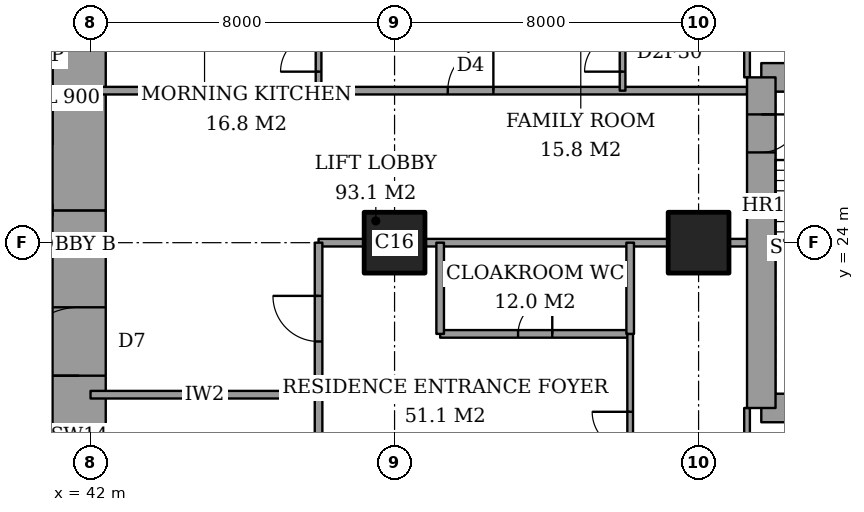
"""IFC4 building model, lengths in metres.
Left out: names, types, materials, properties, quantities, classifications, styles, units other than length and angle.
Written with IfcOpenShell. Run it as: python <this file> out.ifc"""

import sys

from ifc_helpers import new_model, si_unit, direction, frame, frame_2d, origin, origin_2d, place, context, subcontext, project, spatial, rectangle, extrude, element, fill, save


model = new_model("IFC4")
c1 = context("Model", 3, precision=1e-05, world=origin(), true_north=direction((0.0, 1.0)))
c2 = subcontext(c1, "Body", "Model", "MODEL_VIEW")
j1 = project(units=[si_unit("LENGTHUNIT", "METRE"), si_unit("PLANEANGLEUNIT", "RADIAN")], contexts=[c1])
p1 = place(None, origin())
s1 = spatial("IfcSite", under=j1, at=p1, CompositionType="ELEMENT")
p2 = place(p1, origin())
s2 = spatial("IfcBuilding", under=s1, at=p2, CompositionType="ELEMENT")
p3 = place(p2, frame((0.0, 0.0, 266.4)))
s3 = spatial("IfcBuildingStorey", under=s2, at=p3, CompositionType="ELEMENT", Elevation=266.4)
for number, where, z_axis, x_axis in (
    (1, (50.0, 24.0, 0.0), (0.0, 0.0, 1.0), (1.0, 0.0, 0.0)),
    (2, (58.0, 24.0, 0.0), (0.0, 0.0, 1.0), (1.0, 0.0, 0.0)),
):
    element("IfcColumn", number, at=place(p3, frame(where, z_axis=z_axis, x_axis=x_axis)), inside=s3, PredefinedType="COLUMN", context=c2, shape_type="SweptSolid", body=[
        extrude(rectangle(XDim=1.6, YDim=1.6, at=origin_2d()), origin(), (0.0, 0.0, 1.0), 3.6),
    ])
p4 = place(p3, frame((41.7, 13.0, 0.0), z_axis=(0.0, 0.0, 1.0), x_axis=(0.0, 1.0, 0.0)))
e3 = element("IfcWall", 3, at=p4, inside=s3, PredefinedType="SHEAR", context=c2, shape_type="SweptSolid", body=[
    extrude(rectangle(XDim=11.85, YDim=1.4, at=frame_2d((5.925, 0.0))), origin(), (0.0, 0.0, 1.0), 3.6),
])
p5 = place(p4, frame((7.5, 0.0, 0.0)))
e4 = element("IfcOpeningElement", 4, at=p5, cuts=e3, PredefinedType="OPENING", context=c2, shape_type="SweptSolid", body=[
    extrude(rectangle(XDim=1.8, YDim=2.4, at=frame_2d((0.9, 1.2))), frame((0.0, 0.71, 0.0), z_axis=(0.0, -1.0, 0.0), x_axis=(1.0, 0.0, 0.0)), (0.0, 0.0, 1.0), 1.42),
])
p6 = place(p3, frame((41.7, 24.85, 0.0), z_axis=(0.0, 0.0, 1.0), x_axis=(0.0, 1.0, 0.0)))
e5 = element("IfcWall", 5, at=p6, inside=s3, PredefinedType="SHEAR", context=c2, shape_type="SweptSolid", body=[
    extrude(rectangle(XDim=10.15, YDim=1.4, at=frame_2d((5.075, 0.0))), origin(), (0.0, 0.0, 1.0), 3.6),
])
for number, where, z_axis, x_axis in (
    (6, (59.65, 19.65, 0.0), (0.0, 0.0, 1.0), (1.0, 0.0, 0.0)),
    (7, (64.1, 28.35, 0.0), (0.0, 0.0, 1.0), (-1.0, 0.0, 0.0)),
):
    element("IfcWall", number, at=place(p3, frame(where, z_axis=z_axis, x_axis=x_axis)), inside=s3, PredefinedType="SHEAR", context=c2, shape_type="SweptSolid", body=[
        extrude(rectangle(XDim=4.45, YDim=0.75, at=frame_2d((2.225, 0.0))), origin(), (0.0, 0.0, 1.0), 3.6),
    ])
p7 = place(p3, frame((59.65, 28.35, 0.0), z_axis=(0.0, 0.0, 1.0), x_axis=(0.0, -1.0, 0.0)))
e8 = element("IfcWall", 8, at=p7, inside=s3, PredefinedType="SHEAR", context=c2, shape_type="SweptSolid", body=[
    extrude(rectangle(XDim=8.7, YDim=0.75, at=frame_2d((4.35, 0.0))), origin(), (0.0, 0.0, 1.0), 3.6),
])
p8 = place(p7, frame((0.975, 0.0, 0.0)))
e9 = element("IfcOpeningElement", 9, at=p8, cuts=e8, PredefinedType="OPENING", context=c2, shape_type="SweptSolid", body=[
    extrude(rectangle(XDim=1.0, YDim=2.1, at=frame_2d((0.5, 1.05))), frame((0.0, 0.385, 0.0), z_axis=(0.0, -1.0, 0.0), x_axis=(1.0, 0.0, 0.0)), (0.0, 0.0, 1.0), 0.77),
])
p9 = place(p3, frame((42.0, 20.0, 0.0), z_axis=(0.0, 0.0, 1.0), x_axis=(1.0, 0.0, 0.0)))
e10 = element("IfcWall", 10, at=p9, inside=s3, PredefinedType="PARTITIONING", context=c2, shape_type="SweptSolid", body=[
    extrude(rectangle(XDim=6.0, YDim=0.2, at=frame_2d((3.0, 0.0))), origin(), (0.0, 0.0, 1.0), 3.35),
])
p10 = place(p3, frame((51.2, 21.6, 0.0), z_axis=(0.0, 0.0, 1.0), x_axis=(1.0, 0.0, 0.0)))
e11 = element("IfcWall", 11, at=p10, inside=s3, PredefinedType="PARTITIONING", context=c2, shape_type="SweptSolid", body=[
    extrude(rectangle(XDim=5.0, YDim=0.2, at=frame_2d((2.5, 0.0))), origin(), (0.0, 0.0, 1.0), 3.35),
])
p11 = place(p10, frame((2.05, 0.0, 0.0)))
e12 = element("IfcOpeningElement", 12, at=p11, cuts=e11, PredefinedType="OPENING", context=c2, shape_type="SweptSolid", body=[
    extrude(rectangle(XDim=0.9, YDim=2.1, at=frame_2d((0.45, 1.05))), frame((0.0, 0.11, 0.0), z_axis=(0.0, -1.0, 0.0), x_axis=(1.0, 0.0, 0.0)), (0.0, 0.0, 1.0), 0.22),
])
p12 = place(p3, frame((48.0, 24.0, 0.0), z_axis=(0.0, 0.0, 1.0), x_axis=(1.0, 0.0, 0.0)))
e13 = element("IfcWall", 13, at=p12, inside=s3, PredefinedType="PARTITIONING", context=c2, shape_type="SweptSolid", body=[
    extrude(rectangle(XDim=1.2, YDim=0.2, at=frame_2d((0.6, 0.0))), origin(), (0.0, 0.0, 1.0), 3.35),
])
p13 = place(p3, frame((50.8, 24.0, 0.0), z_axis=(0.0, 0.0, 1.0), x_axis=(1.0, 0.0, 0.0)))
e14 = element("IfcWall", 14, at=p13, inside=s3, PredefinedType="PARTITIONING", context=c2, shape_type="SweptSolid", body=[
    extrude(rectangle(XDim=6.4, YDim=0.2, at=frame_2d((3.2, 0.0))), origin(), (0.0, 0.0, 1.0), 3.35),
])
p14 = place(p3, frame((58.8, 24.0, 0.0), z_axis=(0.0, 0.0, 1.0), x_axis=(1.0, 0.0, 0.0)))
e15 = element("IfcWall", 15, at=p14, inside=s3, PredefinedType="PARTITIONING", context=c2, shape_type="SweptSolid", body=[
    extrude(rectangle(XDim=0.475, YDim=0.2, at=frame_2d((0.237, 0.0))), origin(), (0.0, 0.0, 1.0), 3.35),
])
p15 = place(p3, frame((42.0, 28.0, 0.0), z_axis=(0.0, 0.0, 1.0), x_axis=(1.0, 0.0, 0.0)))
e16 = element("IfcWall", 16, at=p15, inside=s3, PredefinedType="PARTITIONING", context=c2, shape_type="SweptSolid", body=[
    extrude(rectangle(XDim=17.275, YDim=0.2, at=frame_2d((8.637, 0.0))), origin(), (0.0, 0.0, 1.0), 3.35),
])
p16 = place(p15, frame((9.4, 0.0, 0.0)))
e17 = element("IfcOpeningElement", 17, at=p16, cuts=e16, PredefinedType="OPENING", context=c2, shape_type="SweptSolid", body=[
    extrude(rectangle(XDim=1.2, YDim=2.4, at=frame_2d((0.6, 1.2))), frame((0.0, 0.11, 0.0), z_axis=(0.0, -1.0, 0.0), x_axis=(1.0, 0.0, 0.0)), (0.0, 0.0, 1.0), 0.22),
])
p17 = place(p3, frame((48.0, 16.5, 0.0), z_axis=(0.0, 0.0, 1.0), x_axis=(0.0, 1.0, 0.0)))
e18 = element("IfcWall", 18, at=p17, inside=s3, PredefinedType="PARTITIONING", context=c2, shape_type="SweptSolid", body=[
    extrude(rectangle(XDim=7.5, YDim=0.2, at=frame_2d((3.75, 0.0))), origin(), (0.0, 0.0, 1.0), 3.35),
])
p18 = place(p17, frame((4.9, 0.0, 0.0)))
e19 = element("IfcOpeningElement", 19, at=p18, cuts=e18, PredefinedType="OPENING", context=c2, shape_type="SweptSolid", body=[
    extrude(rectangle(XDim=1.2, YDim=2.4, at=frame_2d((0.6, 1.2))), frame((0.0, 0.11, 0.0), z_axis=(0.0, -1.0, 0.0), x_axis=(1.0, 0.0, 0.0)), (0.0, 0.0, 1.0), 0.22),
])
p19 = place(p17, frame((1.3, 0.0, 0.0)))
e20 = element("IfcOpeningElement", 20, at=p19, cuts=e18, PredefinedType="OPENING", context=c2, shape_type="SweptSolid", body=[
    extrude(rectangle(XDim=0.9, YDim=2.1, at=frame_2d((0.45, 1.05))), frame((0.0, 0.11, 0.0), z_axis=(0.0, -1.0, 0.0), x_axis=(1.0, 0.0, 0.0)), (0.0, 0.0, 1.0), 0.22),
])
p20 = place(p3, frame((48.0, 28.0, 0.0), z_axis=(0.0, 0.0, 1.0), x_axis=(0.0, 1.0, 0.0)))
e21 = element("IfcWall", 21, at=p20, inside=s3, PredefinedType="PARTITIONING", context=c2, shape_type="SweptSolid", body=[
    extrude(rectangle(XDim=9.2, YDim=0.15, at=frame_2d((4.6, 0.0))), origin(), (0.0, 0.0, 1.0), 3.35),
])
p21 = place(p20, frame((0.5, 0.0, 0.0)))
e22 = element("IfcOpeningElement", 22, at=p21, cuts=e21, PredefinedType="OPENING", context=c2, shape_type="SweptSolid", body=[
    extrude(rectangle(XDim=1.0, YDim=2.1, at=frame_2d((0.5, 1.05))), frame((0.0, 0.085, 0.0), z_axis=(0.0, -1.0, 0.0), x_axis=(1.0, 0.0, 0.0)), (0.0, 0.0, 1.0), 0.17),
])
p22 = place(p3, frame((51.2, 21.6, 0.0), z_axis=(0.0, 0.0, 1.0), x_axis=(0.0, 1.0, 0.0)))
e23 = element("IfcWall", 23, at=p22, inside=s3, PredefinedType="PARTITIONING", context=c2, shape_type="SweptSolid", body=[
    extrude(rectangle(XDim=2.4, YDim=0.2, at=frame_2d((1.2, 0.0))), origin(), (0.0, 0.0, 1.0), 3.35),
])
p23 = place(p3, frame((56.0, 28.0, 0.0), z_axis=(0.0, 0.0, 1.0), x_axis=(0.0, 1.0, 0.0)))
e24 = element("IfcWall", 24, at=p23, inside=s3, PredefinedType="PARTITIONING", context=c2, shape_type="SweptSolid", body=[
    extrude(rectangle(XDim=9.2, YDim=0.15, at=frame_2d((4.6, 0.0))), origin(), (0.0, 0.0, 1.0), 3.35),
])
p24 = place(p23, frame((0.5, 0.0, 0.0)))
e25 = element("IfcOpeningElement", 25, at=p24, cuts=e24, PredefinedType="OPENING", context=c2, shape_type="SweptSolid", body=[
    extrude(rectangle(XDim=1.0, YDim=2.1, at=frame_2d((0.5, 1.05))), frame((0.0, 0.085, 0.0), z_axis=(0.0, -1.0, 0.0), x_axis=(1.0, 0.0, 0.0)), (0.0, 0.0, 1.0), 0.17),
])
p25 = place(p3, frame((56.2, 21.6, 0.0), z_axis=(0.0, 0.0, 1.0), x_axis=(0.0, 1.0, 0.0)))
e26 = element("IfcWall", 26, at=p25, inside=s3, PredefinedType="PARTITIONING", context=c2, shape_type="SweptSolid", body=[
    extrude(rectangle(XDim=2.4, YDim=0.2, at=frame_2d((1.2, 0.0))), origin(), (0.0, 0.0, 1.0), 3.35),
])
p26 = place(p3, frame((56.2, 13.8, 0.0), z_axis=(0.0, 0.0, 1.0), x_axis=(0.0, 1.0, 0.0)))
e27 = element("IfcWall", 27, at=p26, inside=s3, PredefinedType="PARTITIONING", context=c2, shape_type="SweptSolid", body=[
    extrude(rectangle(XDim=7.8, YDim=0.15, at=frame_2d((3.9, 0.0))), origin(), (0.0, 0.0, 1.0), 3.35),
])
p27 = place(p26, frame((4.75, 0.0, 0.0)))
e28 = element("IfcOpeningElement", 28, at=p27, cuts=e27, PredefinedType="OPENING", context=c2, shape_type="SweptSolid", body=[
    extrude(rectangle(XDim=1.0, YDim=2.1, at=frame_2d((0.5, 1.05))), frame((0.0, 0.085, 0.0), z_axis=(0.0, -1.0, 0.0), x_axis=(1.0, 0.0, 0.0)), (0.0, 0.0, 1.0), 0.17),
])
p28 = place(p3, frame((59.275, 17.2, 0.0), z_axis=(0.0, 0.0, 1.0), x_axis=(0.0, 1.0, 0.0)))
e29 = element("IfcWall", 29, at=p28, inside=s3, PredefinedType="PARTITIONING", context=c2, shape_type="SweptSolid", body=[
    extrude(rectangle(XDim=2.45, YDim=0.15, at=frame_2d((1.225, 0.0))), origin(), (0.0, 0.0, 1.0), 3.35),
])
p29 = place(p28, frame((0.538, 0.0, 0.0)))
e30 = element("IfcOpeningElement", 30, at=p29, cuts=e29, PredefinedType="OPENING", context=c2, shape_type="SweptSolid", body=[
    extrude(rectangle(XDim=1.0, YDim=2.1, at=frame_2d((0.5, 1.05))), frame((0.0, 0.085, 0.0), z_axis=(0.0, -1.0, 0.0), x_axis=(1.0, 0.0, 0.0)), (0.0, 0.0, 1.0), 0.17),
])
p30 = place(p3, frame((59.275, 28.35, 0.0), z_axis=(0.0, 0.0, 1.0), x_axis=(0.0, 1.0, 0.0)))
e31 = element("IfcWall", 31, at=p30, inside=s3, PredefinedType="PARTITIONING", context=c2, shape_type="SweptSolid", body=[
    extrude(rectangle(XDim=2.45, YDim=0.15, at=frame_2d((1.225, 0.0))), origin(), (0.0, 0.0, 1.0), 3.35),
])
p31 = place(p30, frame((0.913, 0.0, 0.0)))
e32 = element("IfcOpeningElement", 32, at=p31, cuts=e31, PredefinedType="OPENING", context=c2, shape_type="SweptSolid", body=[
    extrude(rectangle(XDim=1.0, YDim=2.1, at=frame_2d((0.5, 1.05))), frame((0.0, 0.085, 0.0), z_axis=(0.0, -1.0, 0.0), x_axis=(1.0, 0.0, 0.0)), (0.0, 0.0, 1.0), 0.17),
])
p32 = place(p27, origin())
e33 = element("IfcDoor", 33, at=p32, inside=s3, OperationType="SINGLE_SWING_LEFT", PredefinedType="DOOR", context=c2, shape_type="SweptSolid", body=[
    extrude(rectangle(XDim=1.0, YDim=2.1, at=frame_2d((0.5, 1.05))), frame((0.0, 0.025, 0.0), z_axis=(0.0, -1.0, 0.0), x_axis=(1.0, 0.0, 0.0)), (0.0, 0.0, 1.0), 0.05),
])
fill(e28, e33)
p33 = place(p11, origin())
e34 = element("IfcDoor", 34, at=p33, inside=s3, OperationType="SINGLE_SWING_LEFT", PredefinedType="DOOR", context=c2, shape_type="SweptSolid", body=[
    extrude(rectangle(XDim=0.9, YDim=2.1, at=frame_2d((0.45, 1.05))), frame((0.0, 0.025, 0.0), z_axis=(0.0, -1.0, 0.0), x_axis=(1.0, 0.0, 0.0)), (0.0, 0.0, 1.0), 0.05),
])
fill(e12, e34)
p34 = place(p18, origin())
e35 = element("IfcDoor", 35, at=p34, inside=s3, OperationType="SINGLE_SWING_LEFT", PredefinedType="DOOR", context=c2, shape_type="SweptSolid", body=[
    extrude(rectangle(XDim=1.2, YDim=2.4, at=frame_2d((0.6, 1.2))), frame((0.0, 0.025, 0.0), z_axis=(0.0, -1.0, 0.0), x_axis=(1.0, 0.0, 0.0)), (0.0, 0.0, 1.0), 0.05),
])
fill(e19, e35)
p35 = place(p24, origin())
e36 = element("IfcDoor", 36, at=p35, inside=s3, OperationType="SINGLE_SWING_RIGHT", PredefinedType="DOOR", context=c2, shape_type="SweptSolid", body=[
    extrude(rectangle(XDim=1.0, YDim=2.1, at=frame_2d((0.5, 1.05))), frame((0.0, 0.025, 0.0), z_axis=(0.0, -1.0, 0.0), x_axis=(1.0, 0.0, 0.0)), (0.0, 0.0, 1.0), 0.05),
])
fill(e25, e36)
p36 = place(p16, origin())
e37 = element("IfcDoor", 37, at=p36, inside=s3, OperationType="SINGLE_SWING_LEFT", PredefinedType="DOOR", context=c2, shape_type="SweptSolid", body=[
    extrude(rectangle(XDim=1.2, YDim=2.4, at=frame_2d((0.6, 1.2))), frame((0.0, 0.025, 0.0), z_axis=(0.0, -1.0, 0.0), x_axis=(1.0, 0.0, 0.0)), (0.0, 0.0, 1.0), 0.05),
])
fill(e17, e37)
p37 = place(p21, origin())
e38 = element("IfcDoor", 38, at=p37, inside=s3, OperationType="SINGLE_SWING_RIGHT", PredefinedType="DOOR", context=c2, shape_type="SweptSolid", body=[
    extrude(rectangle(XDim=1.0, YDim=2.1, at=frame_2d((0.5, 1.05))), frame((0.0, 0.025, 0.0), z_axis=(0.0, -1.0, 0.0), x_axis=(1.0, 0.0, 0.0)), (0.0, 0.0, 1.0), 0.05),
])
fill(e22, e38)
p38 = place(p5, origin())
e39 = element("IfcDoor", 39, at=p38, inside=s3, OperationType="DOUBLE_DOOR_DOUBLE_SWING", PredefinedType="DOOR", context=c2, shape_type="SweptSolid", body=[
    extrude(rectangle(XDim=1.8, YDim=2.4, at=frame_2d((0.9, 1.2))), frame((0.0, 0.025, 0.0), z_axis=(0.0, -1.0, 0.0), x_axis=(1.0, 0.0, 0.0)), (0.0, 0.0, 1.0), 0.05),
])
fill(e4, e39)
p39 = place(p8, origin())
e40 = element("IfcDoor", 40, at=p39, inside=s3, OperationType="SINGLE_SWING_RIGHT", PredefinedType="DOOR", context=c2, shape_type="SweptSolid", body=[
    extrude(rectangle(XDim=1.0, YDim=2.1, at=frame_2d((0.5, 1.05))), frame((0.0, 0.025, 0.0), z_axis=(0.0, -1.0, 0.0), x_axis=(1.0, 0.0, 0.0)), (0.0, 0.0, 1.0), 0.05),
])
fill(e9, e40)
save(model, sys.argv[1])
